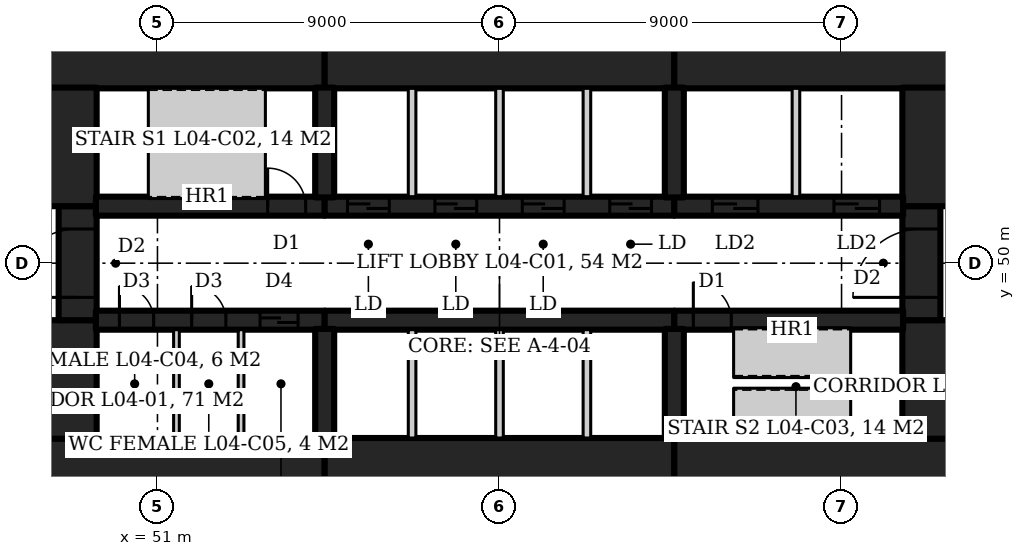
"""IFC4 building model, lengths in metres.
Left out: names, types, materials, properties, quantities, classifications, styles, units other than length and angle.
Written with IfcOpenShell. Run it as: python <this file> out.ifc"""

import sys

from ifc_helpers import new_model, si_unit, direction, frame, frame_2d, origin, place, context, subcontext, project, spatial, rectangle, extrude, element, fill, save


model = new_model("IFC4")
c1 = context("Model", 3, precision=1e-05, world=origin(), true_north=direction((0.0, 1.0)))
c2 = subcontext(c1, "Body", "Model", "MODEL_VIEW")
j1 = project(units=[si_unit("LENGTHUNIT", "METRE"), si_unit("PLANEANGLEUNIT", "RADIAN")], contexts=[c1])
p1 = place(None, origin())
s1 = spatial("IfcSite", under=j1, at=p1, CompositionType="ELEMENT")
p2 = place(p1, origin())
s2 = spatial("IfcBuilding", under=s1, at=p2, CompositionType="ELEMENT")
p3 = place(p2, frame((0.0, 0.0, 26.0)))
s3 = spatial("IfcBuildingStorey", under=s2, at=p3, CompositionType="ELEMENT", Elevation=26.0)
p4 = place(p3, frame((47.6, 55.5, 0.0), z_axis=(0.0, 0.0, 1.0), x_axis=(1.0, 0.0, 0.0)))
e1 = element("IfcWall", 1, at=p4, inside=s3, PredefinedType="SHEAR", context=c2, shape_type="SweptSolid", body=[
    extrude(rectangle(XDim=7.8, YDim=1.8, at=frame_2d((3.9, 0.0))), origin(), (0.0, 0.0, 1.0), 4.2),
])
p5 = place(p3, frame((55.4, 55.5, 0.0), z_axis=(0.0, 0.0, 1.0), x_axis=(1.0, 0.0, 0.0)))
e2 = element("IfcWall", 2, at=p5, inside=s3, PredefinedType="SHEAR", context=c2, shape_type="SweptSolid", body=[
    extrude(rectangle(XDim=9.2, YDim=1.8, at=frame_2d((4.6, 0.0))), origin(), (0.0, 0.0, 1.0), 4.2),
])
for number, where, z_axis, x_axis in (
    (3, (64.6, 55.5, 0.0), (0.0, 0.0, 1.0), (1.0, 0.0, 0.0)),
    (4, (47.6, 44.5, 0.0), (0.0, 0.0, 1.0), (1.0, 0.0, 0.0)),
):
    element("IfcWall", number, at=place(p3, frame(where, z_axis=z_axis, x_axis=x_axis)), inside=s3, PredefinedType="SHEAR", context=c2, shape_type="SweptSolid", body=[
        extrude(rectangle(XDim=7.8, YDim=1.8, at=frame_2d((3.9, 0.0))), origin(), (0.0, 0.0, 1.0), 4.2),
    ])
p6 = place(p3, frame((55.4, 44.5, 0.0), z_axis=(0.0, 0.0, 1.0), x_axis=(1.0, 0.0, 0.0)))
e5 = element("IfcWall", 5, at=p6, inside=s3, PredefinedType="SHEAR", context=c2, shape_type="SweptSolid", body=[
    extrude(rectangle(XDim=9.2, YDim=1.8, at=frame_2d((4.6, 0.0))), origin(), (0.0, 0.0, 1.0), 4.2),
])
p7 = place(p3, frame((64.6, 44.5, 0.0), z_axis=(0.0, 0.0, 1.0), x_axis=(1.0, 0.0, 0.0)))
e6 = element("IfcWall", 6, at=p7, inside=s3, PredefinedType="SHEAR", context=c2, shape_type="SweptSolid", body=[
    extrude(rectangle(XDim=7.8, YDim=1.8, at=frame_2d((3.9, 0.0))), origin(), (0.0, 0.0, 1.0), 4.2),
])
p8 = place(p3, frame((71.5, 45.38, 0.0), z_axis=(0.0, 0.0, 1.0), x_axis=(0.0, 1.0, 0.0)))
e7 = element("IfcWall", 7, at=p8, inside=s3, PredefinedType="SHEAR", context=c2, shape_type="SweptSolid", body=[
    extrude(rectangle(XDim=3.12, YDim=1.8, at=frame_2d((1.56, 0.0))), origin(), (0.0, 0.0, 1.0), 4.2),
])
p9 = place(p3, frame((71.1, 48.5, 0.0), z_axis=(0.0, 0.0, 1.0), x_axis=(0.0, 1.0, 0.0)))
e8 = element("IfcWall", 8, at=p9, inside=s3, PredefinedType="SHEAR", context=c2, shape_type="SweptSolid", body=[
    extrude(rectangle(XDim=3.0, YDim=1.0, at=frame_2d((1.5, 0.0))), origin(), (0.0, 0.0, 1.0), 4.2),
])
p10 = place(p9, frame((0.6, 0.0, 0.0)))
e9 = element("IfcOpeningElement", 9, at=p10, cuts=e8, PredefinedType="OPENING", context=c2, shape_type="SweptSolid", body=[
    extrude(rectangle(XDim=1.8, YDim=2.1, at=frame_2d((0.9, 1.05))), frame((0.0, 0.51, 0.0), z_axis=(0.0, -1.0, 0.0), x_axis=(1.0, 0.0, 0.0)), (0.0, 0.0, 1.0), 1.02),
])
for number, where, z_axis, x_axis in (
    (10, (71.5, 51.5, 0.0), (0.0, 0.0, 1.0), (0.0, 1.0, 0.0)),
    (11, (48.5, 45.38, 0.0), (0.0, 0.0, 1.0), (0.0, 1.0, 0.0)),
):
    element("IfcWall", number, at=place(p3, frame(where, z_axis=z_axis, x_axis=x_axis)), inside=s3, PredefinedType="SHEAR", context=c2, shape_type="SweptSolid", body=[
        extrude(rectangle(XDim=3.12, YDim=1.8, at=frame_2d((1.56, 0.0))), origin(), (0.0, 0.0, 1.0), 4.2),
    ])
p11 = place(p3, frame((48.9, 48.5, 0.0), z_axis=(0.0, 0.0, 1.0), x_axis=(0.0, 1.0, 0.0)))
e12 = element("IfcWall", 12, at=p11, inside=s3, PredefinedType="SHEAR", context=c2, shape_type="SweptSolid", body=[
    extrude(rectangle(XDim=3.0, YDim=1.0, at=frame_2d((1.5, 0.0))), origin(), (0.0, 0.0, 1.0), 4.2),
])
p12 = place(p11, frame((0.6, 0.0, 0.0)))
e13 = element("IfcOpeningElement", 13, at=p12, cuts=e12, PredefinedType="OPENING", context=c2, shape_type="SweptSolid", body=[
    extrude(rectangle(XDim=1.8, YDim=2.1, at=frame_2d((0.9, 1.05))), frame((0.0, 0.51, 0.0), z_axis=(0.0, -1.0, 0.0), x_axis=(1.0, 0.0, 0.0)), (0.0, 0.0, 1.0), 1.02),
])
p13 = place(p3, frame((48.5, 51.5, 0.0), z_axis=(0.0, 0.0, 1.0), x_axis=(0.0, 1.0, 0.0)))
e14 = element("IfcWall", 14, at=p13, inside=s3, PredefinedType="SHEAR", context=c2, shape_type="SweptSolid", body=[
    extrude(rectangle(XDim=3.12, YDim=1.8, at=frame_2d((1.56, 0.0))), origin(), (0.0, 0.0, 1.0), 4.2),
])
p14 = place(p3, frame((49.38, 51.5, 0.0), z_axis=(0.0, 0.0, 1.0), x_axis=(1.0, 0.0, 0.0)))
e15 = element("IfcWall", 15, at=p14, inside=s3, PredefinedType="SHEAR", context=c2, shape_type="SweptSolid", body=[
    extrude(rectangle(XDim=6.02, YDim=0.5, at=frame_2d((3.01, 0.0))), origin(), (0.0, 0.0, 1.0), 4.2),
])
p15 = place(p14, frame((4.52, 0.0, 0.0)))
e16 = element("IfcOpeningElement", 16, at=p15, cuts=e15, PredefinedType="OPENING", context=c2, shape_type="SweptSolid", body=[
    extrude(rectangle(XDim=1.0, YDim=2.1, at=frame_2d((0.5, 1.05))), frame((0.0, 0.26, 0.0), z_axis=(0.0, -1.0, 0.0), x_axis=(1.0, 0.0, 0.0)), (0.0, 0.0, 1.0), 0.52),
])
p16 = place(p3, frame((55.4, 51.5, 0.0), z_axis=(0.0, 0.0, 1.0), x_axis=(1.0, 0.0, 0.0)))
e17 = element("IfcWall", 17, at=p16, inside=s3, PredefinedType="SHEAR", context=c2, shape_type="SweptSolid", body=[
    extrude(rectangle(XDim=9.2, YDim=0.5, at=frame_2d((4.6, 0.0))), origin(), (0.0, 0.0, 1.0), 4.2),
])
p17 = place(p16, frame((0.6, 0.0, 0.0)))
e18 = element("IfcOpeningElement", 18, at=p17, cuts=e17, PredefinedType="OPENING", context=c2, shape_type="SweptSolid", body=[
    extrude(rectangle(XDim=1.1, YDim=2.1, at=frame_2d((0.55, 1.05))), frame((0.0, 0.26, 0.0), z_axis=(0.0, -1.0, 0.0), x_axis=(1.0, 0.0, 0.0)), (0.0, 0.0, 1.0), 0.52),
])
p18 = place(p16, frame((2.9, 0.0, 0.0)))
e19 = element("IfcOpeningElement", 19, at=p18, cuts=e17, PredefinedType="OPENING", context=c2, shape_type="SweptSolid", body=[
    extrude(rectangle(XDim=1.1, YDim=2.1, at=frame_2d((0.55, 1.05))), frame((0.0, 0.26, 0.0), z_axis=(0.0, -1.0, 0.0), x_axis=(1.0, 0.0, 0.0)), (0.0, 0.0, 1.0), 0.52),
])
p19 = place(p16, frame((5.2, 0.0, 0.0)))
e20 = element("IfcOpeningElement", 20, at=p19, cuts=e17, PredefinedType="OPENING", context=c2, shape_type="SweptSolid", body=[
    extrude(rectangle(XDim=1.1, YDim=2.1, at=frame_2d((0.55, 1.05))), frame((0.0, 0.26, 0.0), z_axis=(0.0, -1.0, 0.0), x_axis=(1.0, 0.0, 0.0)), (0.0, 0.0, 1.0), 0.52),
])
p20 = place(p16, frame((7.5, 0.0, 0.0)))
e21 = element("IfcOpeningElement", 21, at=p20, cuts=e17, PredefinedType="OPENING", context=c2, shape_type="SweptSolid", body=[
    extrude(rectangle(XDim=1.1, YDim=2.1, at=frame_2d((0.55, 1.05))), frame((0.0, 0.26, 0.0), z_axis=(0.0, -1.0, 0.0), x_axis=(1.0, 0.0, 0.0)), (0.0, 0.0, 1.0), 0.52),
])
p21 = place(p3, frame((64.6, 51.5, 0.0), z_axis=(0.0, 0.0, 1.0), x_axis=(1.0, 0.0, 0.0)))
e22 = element("IfcWall", 22, at=p21, inside=s3, PredefinedType="SHEAR", context=c2, shape_type="SweptSolid", body=[
    extrude(rectangle(XDim=6.02, YDim=0.5, at=frame_2d((3.01, 0.0))), origin(), (0.0, 0.0, 1.0), 4.2),
])
p22 = place(p21, frame((1.0, 0.0, 0.0)))
e23 = element("IfcOpeningElement", 23, at=p22, cuts=e22, PredefinedType="OPENING", context=c2, shape_type="SweptSolid", body=[
    extrude(rectangle(XDim=1.2, YDim=2.1, at=frame_2d((0.6, 1.05))), frame((0.0, 0.26, 0.0), z_axis=(0.0, -1.0, 0.0), x_axis=(1.0, 0.0, 0.0)), (0.0, 0.0, 1.0), 0.52),
])
p23 = place(p21, frame((4.2, 0.0, 0.0)))
e24 = element("IfcOpeningElement", 24, at=p23, cuts=e22, PredefinedType="OPENING", context=c2, shape_type="SweptSolid", body=[
    extrude(rectangle(XDim=1.2, YDim=2.1, at=frame_2d((0.6, 1.05))), frame((0.0, 0.26, 0.0), z_axis=(0.0, -1.0, 0.0), x_axis=(1.0, 0.0, 0.0)), (0.0, 0.0, 1.0), 0.52),
])
p24 = place(p3, frame((49.38, 48.5, 0.0), z_axis=(0.0, 0.0, 1.0), x_axis=(1.0, 0.0, 0.0)))
e25 = element("IfcWall", 25, at=p24, inside=s3, PredefinedType="SHEAR", context=c2, shape_type="SweptSolid", body=[
    extrude(rectangle(XDim=6.02, YDim=0.5, at=frame_2d((3.01, 0.0))), origin(), (0.0, 0.0, 1.0), 4.2),
])
p25 = place(p24, frame((0.62, 0.0, 0.0)))
e26 = element("IfcOpeningElement", 26, at=p25, cuts=e25, PredefinedType="OPENING", context=c2, shape_type="SweptSolid", body=[
    extrude(rectangle(XDim=0.9, YDim=2.1, at=frame_2d((0.45, 1.05))), frame((0.0, 0.26, 0.0), z_axis=(0.0, -1.0, 0.0), x_axis=(1.0, 0.0, 0.0)), (0.0, 0.0, 1.0), 0.52),
])
p26 = place(p24, frame((2.52, 0.0, 0.0)))
e27 = element("IfcOpeningElement", 27, at=p26, cuts=e25, PredefinedType="OPENING", context=c2, shape_type="SweptSolid", body=[
    extrude(rectangle(XDim=0.9, YDim=2.1, at=frame_2d((0.45, 1.05))), frame((0.0, 0.26, 0.0), z_axis=(0.0, -1.0, 0.0), x_axis=(1.0, 0.0, 0.0)), (0.0, 0.0, 1.0), 0.52),
])
p27 = place(p24, frame((4.32, 0.0, 0.0)))
e28 = element("IfcOpeningElement", 28, at=p27, cuts=e25, PredefinedType="OPENING", context=c2, shape_type="SweptSolid", body=[
    extrude(rectangle(XDim=1.0, YDim=2.1, at=frame_2d((0.5, 1.05))), frame((0.0, 0.26, 0.0), z_axis=(0.0, -1.0, 0.0), x_axis=(1.0, 0.0, 0.0)), (0.0, 0.0, 1.0), 0.52),
])
p28 = place(p3, frame((55.4, 48.5, 0.0), z_axis=(0.0, 0.0, 1.0), x_axis=(1.0, 0.0, 0.0)))
e29 = element("IfcWall", 29, at=p28, inside=s3, PredefinedType="SHEAR", context=c2, shape_type="SweptSolid", body=[
    extrude(rectangle(XDim=9.2, YDim=0.5, at=frame_2d((4.6, 0.0))), origin(), (0.0, 0.0, 1.0), 4.2),
])
p29 = place(p3, frame((64.6, 48.5, 0.0), z_axis=(0.0, 0.0, 1.0), x_axis=(1.0, 0.0, 0.0)))
e30 = element("IfcWall", 30, at=p29, inside=s3, PredefinedType="SHEAR", context=c2, shape_type="SweptSolid", body=[
    extrude(rectangle(XDim=6.02, YDim=0.5, at=frame_2d((3.01, 0.0))), origin(), (0.0, 0.0, 1.0), 4.2),
])
p30 = place(p29, frame((0.5, 0.0, 0.0)))
e31 = element("IfcOpeningElement", 31, at=p30, cuts=e30, PredefinedType="OPENING", context=c2, shape_type="SweptSolid", body=[
    extrude(rectangle(XDim=1.0, YDim=2.1, at=frame_2d((0.5, 1.05))), frame((0.0, 0.26, 0.0), z_axis=(0.0, -1.0, 0.0), x_axis=(1.0, 0.0, 0.0)), (0.0, 0.0, 1.0), 0.52),
])
for number, where, z_axis, x_axis in (
    (32, (55.4, 51.73, 0.0), (0.0, 0.0, 1.0), (0.0, 1.0, 0.0)),
    (33, (64.6, 51.73, 0.0), (0.0, 0.0, 1.0), (0.0, 1.0, 0.0)),
    (34, (55.4, 48.27, 0.0), (0.0, 0.0, 1.0), (0.0, -1.0, 0.0)),
    (35, (64.6, 48.27, 0.0), (0.0, 0.0, 1.0), (0.0, -1.0, 0.0)),
):
    element("IfcWall", number, at=place(p3, frame(where, z_axis=z_axis, x_axis=x_axis)), inside=s3, PredefinedType="SHEAR", context=c2, shape_type="SweptSolid", body=[
        extrude(rectangle(XDim=2.89, YDim=0.5, at=frame_2d((1.445, 0.0))), origin(), (0.0, 0.0, 1.0), 4.2),
    ])
for number, where, z_axis, x_axis in (
    (36, (57.7, 51.75, 0.0), (0.0, 0.0, 1.0), (0.0, 1.0, 0.0)),
    (37, (60.0, 51.75, 0.0), (0.0, 0.0, 1.0), (0.0, 1.0, 0.0)),
    (38, (62.3, 51.75, 0.0), (0.0, 0.0, 1.0), (0.0, 1.0, 0.0)),
    (39, (57.7, 45.4, 0.0), (0.0, 0.0, 1.0), (0.0, 1.0, 0.0)),
    (40, (60.0, 45.4, 0.0), (0.0, 0.0, 1.0), (0.0, 1.0, 0.0)),
    (41, (62.3, 45.4, 0.0), (0.0, 0.0, 1.0), (0.0, 1.0, 0.0)),
    (42, (67.8, 51.75, 0.0), (0.0, 0.0, 1.0), (0.0, 1.0, 0.0)),
):
    element("IfcWall", number, at=place(p3, frame(where, z_axis=z_axis, x_axis=x_axis)), inside=s3, PredefinedType="PARTITIONING", context=c2, shape_type="SweptSolid", body=[
        extrude(rectangle(XDim=2.85, YDim=0.2, at=frame_2d((1.425, 0.0))), origin(), (0.0, 0.0, 1.0), 4.2),
    ])
for number, where, z_axis, x_axis in (
    (43, (51.5, 45.4, 0.0), (0.0, 0.0, 1.0), (0.0, 1.0, 0.0)),
    (44, (53.2, 45.4, 0.0), (0.0, 0.0, 1.0), (0.0, 1.0, 0.0)),
):
    element("IfcWall", number, at=place(p3, frame(where, z_axis=z_axis, x_axis=x_axis)), inside=s3, PredefinedType="PARTITIONING", context=c2, shape_type="SweptSolid", body=[
        extrude(rectangle(XDim=2.85, YDim=0.15, at=frame_2d((1.425, 0.0))), origin(), (0.0, 0.0, 1.0), 4.04),
    ])
p31 = place(p15, origin())
e45 = element("IfcDoor", 45, at=p31, inside=s3, OperationType="SINGLE_SWING_LEFT", PredefinedType="DOOR", context=c2, shape_type="SweptSolid", body=[
    extrude(rectangle(XDim=1.0, YDim=2.1, at=frame_2d((0.5, 1.05))), frame((0.0, 0.025, 0.0), z_axis=(0.0, -1.0, 0.0), x_axis=(1.0, 0.0, 0.0)), (0.0, 0.0, 1.0), 0.05),
])
fill(e16, e45)
p32 = place(p30, origin())
e46 = element("IfcDoor", 46, at=p32, inside=s3, OperationType="SINGLE_SWING_LEFT", PredefinedType="DOOR", context=c2, shape_type="SweptSolid", body=[
    extrude(rectangle(XDim=1.0, YDim=2.1, at=frame_2d((0.5, 1.05))), frame((0.0, 0.025, 0.0), z_axis=(0.0, -1.0, 0.0), x_axis=(1.0, 0.0, 0.0)), (0.0, 0.0, 1.0), 0.05),
])
fill(e31, e46)
p33 = place(p22, origin())
e47 = element("IfcDoor", 47, at=p33, inside=s3, OperationType="SLIDING_TO_LEFT", PredefinedType="DOOR", context=c2, shape_type="SweptSolid", body=[
    extrude(rectangle(XDim=1.2, YDim=2.1, at=frame_2d((0.6, 1.05))), frame((0.0, 0.025, 0.0), z_axis=(0.0, -1.0, 0.0), x_axis=(1.0, 0.0, 0.0)), (0.0, 0.0, 1.0), 0.05),
])
fill(e23, e47)
p34 = place(p23, origin())
e48 = element("IfcDoor", 48, at=p34, inside=s3, OperationType="SLIDING_TO_LEFT", PredefinedType="DOOR", context=c2, shape_type="SweptSolid", body=[
    extrude(rectangle(XDim=1.2, YDim=2.1, at=frame_2d((0.6, 1.05))), frame((0.0, 0.025, 0.0), z_axis=(0.0, -1.0, 0.0), x_axis=(1.0, 0.0, 0.0)), (0.0, 0.0, 1.0), 0.05),
])
fill(e24, e48)
p35 = place(p17, origin())
e49 = element("IfcDoor", 49, at=p35, inside=s3, OperationType="SLIDING_TO_LEFT", PredefinedType="DOOR", context=c2, shape_type="SweptSolid", body=[
    extrude(rectangle(XDim=1.1, YDim=2.1, at=frame_2d((0.55, 1.05))), frame((0.0, 0.025, 0.0), z_axis=(0.0, -1.0, 0.0), x_axis=(1.0, 0.0, 0.0)), (0.0, 0.0, 1.0), 0.05),
])
fill(e18, e49)
p36 = place(p18, origin())
e50 = element("IfcDoor", 50, at=p36, inside=s3, OperationType="SLIDING_TO_LEFT", PredefinedType="DOOR", context=c2, shape_type="SweptSolid", body=[
    extrude(rectangle(XDim=1.1, YDim=2.1, at=frame_2d((0.55, 1.05))), frame((0.0, 0.025, 0.0), z_axis=(0.0, -1.0, 0.0), x_axis=(1.0, 0.0, 0.0)), (0.0, 0.0, 1.0), 0.05),
])
fill(e19, e50)
p37 = place(p19, origin())
e51 = element("IfcDoor", 51, at=p37, inside=s3, OperationType="SLIDING_TO_LEFT", PredefinedType="DOOR", context=c2, shape_type="SweptSolid", body=[
    extrude(rectangle(XDim=1.1, YDim=2.1, at=frame_2d((0.55, 1.05))), frame((0.0, 0.025, 0.0), z_axis=(0.0, -1.0, 0.0), x_axis=(1.0, 0.0, 0.0)), (0.0, 0.0, 1.0), 0.05),
])
fill(e20, e51)
p38 = place(p20, origin())
e52 = element("IfcDoor", 52, at=p38, inside=s3, OperationType="SLIDING_TO_LEFT", PredefinedType="DOOR", context=c2, shape_type="SweptSolid", body=[
    extrude(rectangle(XDim=1.1, YDim=2.1, at=frame_2d((0.55, 1.05))), frame((0.0, 0.025, 0.0), z_axis=(0.0, -1.0, 0.0), x_axis=(1.0, 0.0, 0.0)), (0.0, 0.0, 1.0), 0.05),
])
fill(e21, e52)
p39 = place(p25, origin())
e53 = element("IfcDoor", 53, at=p39, inside=s3, OperationType="SINGLE_SWING_RIGHT", PredefinedType="DOOR", context=c2, shape_type="SweptSolid", body=[
    extrude(rectangle(XDim=0.9, YDim=2.1, at=frame_2d((0.45, 1.05))), frame((0.0, 0.025, 0.0), z_axis=(0.0, -1.0, 0.0), x_axis=(1.0, 0.0, 0.0)), (0.0, 0.0, 1.0), 0.05),
])
fill(e26, e53)
p40 = place(p26, origin())
e54 = element("IfcDoor", 54, at=p40, inside=s3, OperationType="SINGLE_SWING_RIGHT", PredefinedType="DOOR", context=c2, shape_type="SweptSolid", body=[
    extrude(rectangle(XDim=0.9, YDim=2.1, at=frame_2d((0.45, 1.05))), frame((0.0, 0.025, 0.0), z_axis=(0.0, -1.0, 0.0), x_axis=(1.0, 0.0, 0.0)), (0.0, 0.0, 1.0), 0.05),
])
fill(e27, e54)
p41 = place(p27, origin())
e55 = element("IfcDoor", 55, at=p41, inside=s3, OperationType="SLIDING_TO_LEFT", PredefinedType="DOOR", context=c2, shape_type="SweptSolid", body=[
    extrude(rectangle(XDim=1.0, YDim=2.1, at=frame_2d((0.5, 1.05))), frame((0.0, 0.025, 0.0), z_axis=(0.0, -1.0, 0.0), x_axis=(1.0, 0.0, 0.0)), (0.0, 0.0, 1.0), 0.05),
])
fill(e28, e55)
p42 = place(p10, origin())
e56 = element("IfcDoor", 56, at=p42, inside=s3, OperationType="DOUBLE_DOOR_DOUBLE_SWING", PredefinedType="DOOR", context=c2, shape_type="SweptSolid", body=[
    extrude(rectangle(XDim=1.8, YDim=2.1, at=frame_2d((0.9, 1.05))), frame((0.0, 0.025, 0.0), z_axis=(0.0, -1.0, 0.0), x_axis=(1.0, 0.0, 0.0)), (0.0, 0.0, 1.0), 0.05),
])
fill(e9, e56)
p43 = place(p12, origin())
e57 = element("IfcDoor", 57, at=p43, inside=s3, OperationType="DOUBLE_DOOR_DOUBLE_SWING", PredefinedType="DOOR", context=c2, shape_type="SweptSolid", body=[
    extrude(rectangle(XDim=1.8, YDim=2.1, at=frame_2d((0.9, 1.05))), frame((0.0, 0.025, 0.0), z_axis=(0.0, -1.0, 0.0), x_axis=(1.0, 0.0, 0.0)), (0.0, 0.0, 1.0), 0.05),
])
fill(e13, e57)
save(model, sys.argv[1])
